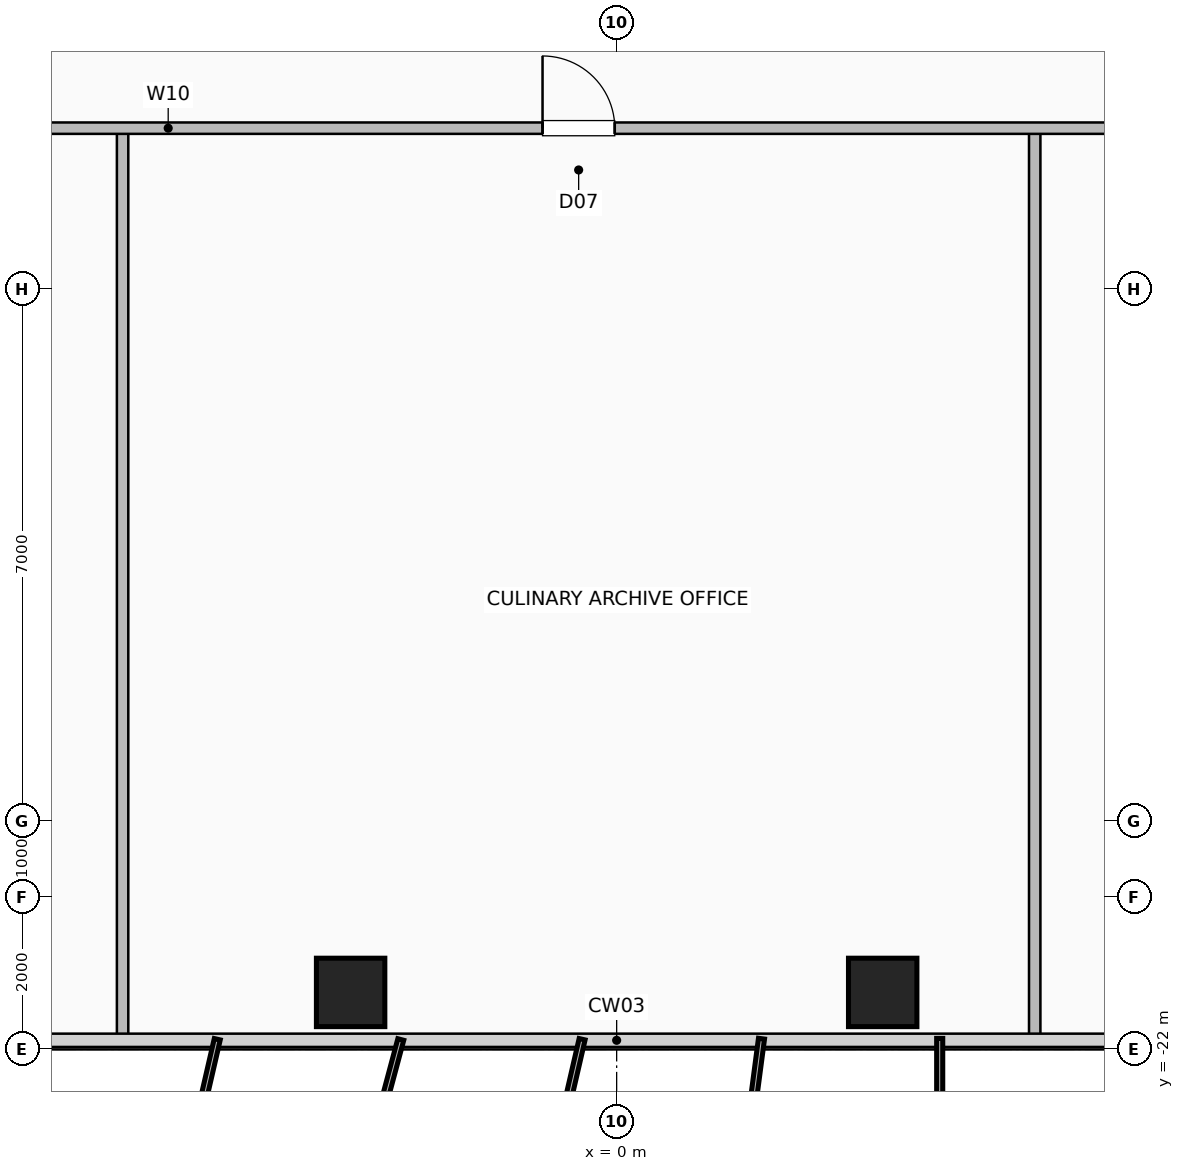
"""IFC4 building model, lengths in metres.
Left out: names, types, materials, properties, quantities, classifications, styles, units other than length and angle.
Written with IfcOpenShell. Run it as: python <this file> out.ifc"""

import sys

from ifc_helpers import new_model, si_unit, direction, frame, frame_2d, origin, origin_2d, place, context, subcontext, project, spatial, rectangle, hollow_rectangle, extrude, element, fill, save


model = new_model("IFC4")
c1 = context("Model", 3, precision=1e-05, world=origin(), true_north=direction((0.0, 1.0)))
c2 = subcontext(c1, "Body", "Model", "MODEL_VIEW")
j1 = project(units=[si_unit("LENGTHUNIT", "METRE"), si_unit("PLANEANGLEUNIT", "RADIAN")], contexts=[c1])
p1 = place(None, origin())
s1 = spatial("IfcSite", under=j1, at=p1, CompositionType="ELEMENT")
p2 = place(p1, origin())
s2 = spatial("IfcBuilding", under=s1, at=p2, CompositionType="ELEMENT")
p3 = place(p2, frame((0.0, 0.0, 126.4)))
s3 = spatial("IfcBuildingStorey", under=s2, at=p3, CompositionType="ELEMENT", Elevation=126.4)
for number, where, z_axis, x_axis in (
    (1, (-3.5, -21.25, 0.0), (0.0, 0.0, 1.0), (1.0, 0.0, 0.0)),
    (2, (3.5, -21.25, 0.0), (0.0, 0.0, 1.0), (1.0, 0.0, 0.0)),
):
    element("IfcColumn", number, at=place(p3, frame(where, z_axis=z_axis, x_axis=x_axis)), inside=s3, PredefinedType="COLUMN", context=c2, shape_type="SweptSolid", body=[
        extrude(hollow_rectangle(XDim=0.9, YDim=0.9, WallThickness=0.045, at=origin_2d()), origin(), (0.0, 0.0, 1.0), 3.6),
    ])
for number, where, z_axis, x_axis in (
    (3, (-6.5, -21.82, 0.0), (0.0, 0.0, 1.0), (0.0, 1.0, 0.0)),
    (4, (5.5, -21.82, 0.0), (0.0, 0.0, 1.0), (0.0, 1.0, 0.0)),
):
    element("IfcWall", number, at=place(p3, frame(where, z_axis=z_axis, x_axis=x_axis)), inside=s3, PredefinedType="PARTITIONING", context=c2, shape_type="SweptSolid", body=[
        extrude(rectangle(XDim=11.94, YDim=0.15, at=frame_2d((5.97, 0.0))), origin(), (0.0, 0.0, 1.0), 3.36),
    ])
p4 = place(p3, frame((-17.07, -9.88, 0.0), z_axis=(0.0, 0.0, 1.0), x_axis=(1.0, 0.0, 0.0)))
e5 = element("IfcWall", 5, at=p4, inside=s3, PredefinedType="PARTITIONING", context=c2, shape_type="SweptSolid", body=[
    extrude(rectangle(XDim=34.14, YDim=0.15, at=frame_2d((17.07, 0.0))), origin(), (0.0, 0.0, 1.0), 3.36),
])
p5 = place(p4, frame((4.445, 0.0, 0.0)))
e6 = element("IfcOpeningElement", 6, at=p5, cuts=e5, PredefinedType="OPENING", context=c2, shape_type="SweptSolid", body=[
    extrude(rectangle(XDim=1.8, YDim=2.08, at=frame_2d((0.9, 1.04))), frame((0.0, 0.085, 0.0), z_axis=(0.0, -1.0, 0.0), x_axis=(1.0, 0.0, 0.0)), (0.0, 0.0, 1.0), 0.17),
])
p6 = place(p4, frame((16.095, 0.0, 0.0)))
e7 = element("IfcOpeningElement", 7, at=p6, cuts=e5, PredefinedType="OPENING", context=c2, shape_type="SweptSolid", body=[
    extrude(rectangle(XDim=0.95, YDim=2.06, at=frame_2d((0.475, 1.03))), frame((0.0, 0.085, 0.0), z_axis=(0.0, -1.0, 0.0), x_axis=(1.0, 0.0, 0.0)), (0.0, 0.0, 1.0), 0.17),
])
p7 = place(p4, frame((25.095, 0.0, 0.0)))
e8 = element("IfcOpeningElement", 8, at=p7, cuts=e5, PredefinedType="OPENING", context=c2, shape_type="SweptSolid", body=[
    extrude(rectangle(XDim=0.95, YDim=2.06, at=frame_2d((0.475, 1.03))), frame((0.0, 0.085, 0.0), z_axis=(0.0, -1.0, 0.0), x_axis=(1.0, 0.0, 0.0)), (0.0, 0.0, 1.0), 0.17),
])
p8 = place(p4, frame((30.82, 0.0, 0.0)))
e9 = element("IfcOpeningElement", 9, at=p8, cuts=e5, PredefinedType="OPENING", context=c2, shape_type="SweptSolid", body=[
    extrude(rectangle(XDim=0.95, YDim=2.06, at=frame_2d((0.475, 1.03))), frame((0.0, 0.085, 0.0), z_axis=(0.0, -1.0, 0.0), x_axis=(1.0, 0.0, 0.0)), (0.0, 0.0, 1.0), 0.17),
])
p9 = place(p6, origin())
e10 = element("IfcDoor", 10, at=p9, inside=s3, OperationType="SINGLE_SWING_LEFT", PredefinedType="DOOR", context=c2, shape_type="SweptSolid", body=[
    extrude(rectangle(XDim=0.95, YDim=2.06, at=frame_2d((0.475, 1.03))), frame((0.0, 0.025, 0.0), z_axis=(0.0, -1.0, 0.0), x_axis=(1.0, 0.0, 0.0)), (0.0, 0.0, 1.0), 0.05),
])
fill(e7, e10)
save(model, sys.argv[1])
